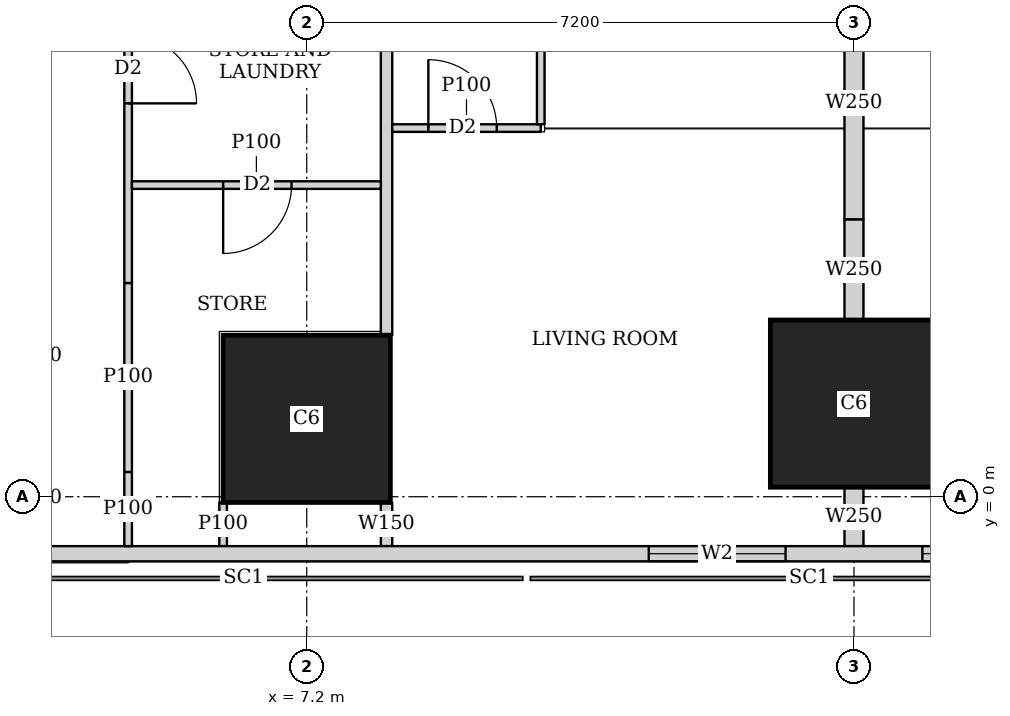
"""IFC4 building model, lengths in metres.
Left out: names, types, materials, properties, quantities, classifications, styles, units other than length and angle.
Written with IfcOpenShell. Run it as: python <this file> out.ifc"""

import sys

from ifc_helpers import new_model, si_unit, direction, frame, frame_2d, origin, origin_2d, place, context, subcontext, project, spatial, rectangle, extrude, element, fill, save


model = new_model("IFC4")
c1 = context("Model", 3, precision=1e-05, world=origin(), true_north=direction((0.0, 1.0)))
c2 = subcontext(c1, "Body", "Model", "MODEL_VIEW")
j1 = project(units=[si_unit("LENGTHUNIT", "METRE"), si_unit("PLANEANGLEUNIT", "RADIAN")], contexts=[c1])
p1 = place(None, origin())
s1 = spatial("IfcSite", under=j1, at=p1, CompositionType="ELEMENT")
p2 = place(p1, origin())
s2 = spatial("IfcBuilding", under=s1, at=p2, CompositionType="ELEMENT")
p3 = place(p2, frame((0.0, 0.0, 77.9)))
s3 = spatial("IfcBuildingStorey", under=s2, at=p3, CompositionType="ELEMENT", Elevation=77.9)
for number, where, z_axis, x_axis in (
    (1, (7.2, 1.025, 0.0), (0.0, 0.0, 1.0), (1.0, 0.0, 0.0)),
    (2, (14.4, 1.225, 0.0), (0.0, 0.0, 1.0), (1.0, 0.0, 0.0)),
):
    element("IfcColumn", number, at=place(p3, frame(where, z_axis=z_axis, x_axis=x_axis)), inside=s3, PredefinedType="COLUMN", context=c2, shape_type="SweptSolid", body=[
        extrude(rectangle(XDim=2.2, YDim=2.2, at=origin_2d()), origin(), (0.0, 0.0, 1.0), 3.75),
    ])
p4 = place(p3, frame((2.163, -0.75, 0.0), z_axis=(0.0, 0.0, 1.0), x_axis=(1.0, 0.0, 0.0)))
e3 = element("IfcWall", 3, at=p4, inside=s3, PredefinedType="SOLIDWALL", context=c2, shape_type="SweptSolid", body=[
    extrude(rectangle(XDim=45.628, YDim=0.2, at=frame_2d((22.814, 0.0))), origin(), (0.0, 0.0, 1.0), 3.5),
])
p5 = place(p4, frame((9.537, 0.0, 0.9)))
e4 = element("IfcOpeningElement", 4, at=p5, cuts=e3, PredefinedType="OPENING", context=c2, shape_type="SweptSolid", body=[
    extrude(rectangle(XDim=1.8, YDim=1.5, at=frame_2d((0.9, 0.75))), frame((0.0, 0.11, 0.0), z_axis=(0.0, -1.0, 0.0), x_axis=(1.0, 0.0, 0.0)), (0.0, 0.0, 1.0), 0.22),
])
p6 = place(p4, frame((13.137, 0.0, 0.9)))
e5 = element("IfcOpeningElement", 5, at=p6, cuts=e3, PredefinedType="OPENING", context=c2, shape_type="SweptSolid", body=[
    extrude(rectangle(XDim=1.8, YDim=1.5, at=frame_2d((0.9, 0.75))), frame((0.0, 0.11, 0.0), z_axis=(0.0, -1.0, 0.0), x_axis=(1.0, 0.0, 0.0)), (0.0, 0.0, 1.0), 0.22),
])
p7 = place(p4, frame((16.737, 0.0, 0.9)))
e6 = element("IfcOpeningElement", 6, at=p7, cuts=e3, PredefinedType="OPENING", context=c2, shape_type="SweptSolid", body=[
    extrude(rectangle(XDim=1.8, YDim=1.5, at=frame_2d((0.9, 0.75))), frame((0.0, 0.11, 0.0), z_axis=(0.0, -1.0, 0.0), x_axis=(1.0, 0.0, 0.0)), (0.0, 0.0, 1.0), 0.22),
])
p8 = place(p4, frame((20.337, 0.0, 0.9)))
e7 = element("IfcOpeningElement", 7, at=p8, cuts=e3, PredefinedType="OPENING", context=c2, shape_type="SweptSolid", body=[
    extrude(rectangle(XDim=1.8, YDim=1.5, at=frame_2d((0.9, 0.75))), frame((0.0, 0.11, 0.0), z_axis=(0.0, -1.0, 0.0), x_axis=(1.0, 0.0, 0.0)), (0.0, 0.0, 1.0), 0.22),
])
p9 = place(p4, frame((23.937, 0.0, 0.9)))
e8 = element("IfcOpeningElement", 8, at=p9, cuts=e3, PredefinedType="OPENING", context=c2, shape_type="SweptSolid", body=[
    extrude(rectangle(XDim=1.8, YDim=1.5, at=frame_2d((0.9, 0.75))), frame((0.0, 0.11, 0.0), z_axis=(0.0, -1.0, 0.0), x_axis=(1.0, 0.0, 0.0)), (0.0, 0.0, 1.0), 0.22),
])
p10 = place(p4, frame((27.537, 0.0, 0.9)))
e9 = element("IfcOpeningElement", 9, at=p10, cuts=e3, PredefinedType="OPENING", context=c2, shape_type="SweptSolid", body=[
    extrude(rectangle(XDim=1.8, YDim=1.5, at=frame_2d((0.9, 0.75))), frame((0.0, 0.11, 0.0), z_axis=(0.0, -1.0, 0.0), x_axis=(1.0, 0.0, 0.0)), (0.0, 0.0, 1.0), 0.22),
])
p11 = place(p4, frame((31.137, 0.0, 0.9)))
e10 = element("IfcOpeningElement", 10, at=p11, cuts=e3, PredefinedType="OPENING", context=c2, shape_type="SweptSolid", body=[
    extrude(rectangle(XDim=1.8, YDim=1.5, at=frame_2d((0.9, 0.75))), frame((0.0, 0.11, 0.0), z_axis=(0.0, -1.0, 0.0), x_axis=(1.0, 0.0, 0.0)), (0.0, 0.0, 1.0), 0.22),
])
p12 = place(p4, frame((34.737, 0.0, 0.9)))
e11 = element("IfcOpeningElement", 11, at=p12, cuts=e3, PredefinedType="OPENING", context=c2, shape_type="SweptSolid", body=[
    extrude(rectangle(XDim=1.8, YDim=1.5, at=frame_2d((0.9, 0.75))), frame((0.0, 0.11, 0.0), z_axis=(0.0, -1.0, 0.0), x_axis=(1.0, 0.0, 0.0)), (0.0, 0.0, 1.0), 0.22),
])
p13 = place(p3, frame((8.25, -0.65, 0.0), z_axis=(0.0, 0.0, 1.0), x_axis=(0.0, 1.0, 0.0)))
e12 = element("IfcWall", 12, at=p13, inside=s3, PredefinedType="SOLIDWALL", context=c2, shape_type="SweptSolid", body=[
    extrude(rectangle(XDim=0.574, YDim=0.15, at=frame_2d((0.287, 0.0))), origin(), (0.0, 0.0, 1.0), 3.5),
])
p14 = place(p3, frame((8.25, 2.126, 0.0), z_axis=(0.0, 0.0, 1.0), x_axis=(0.0, 1.0, 0.0)))
e13 = element("IfcWall", 13, at=p14, inside=s3, PredefinedType="SOLIDWALL", context=c2, shape_type="SweptSolid", body=[
    extrude(rectangle(XDim=40.773, YDim=0.15, at=frame_2d((20.386, 0.0))), origin(), (0.0, 0.0, 1.0), 3.5),
])
p15 = place(p14, frame((17.787, 0.0, 0.0)))
e14 = element("IfcOpeningElement", 14, at=p15, cuts=e13, PredefinedType="OPENING", context=c2, shape_type="SweptSolid", body=[
    extrude(rectangle(XDim=1.0, YDim=2.1, at=frame_2d((0.5, 1.05))), frame((0.0, 0.085, 0.0), z_axis=(0.0, -1.0, 0.0), x_axis=(1.0, 0.0, 0.0)), (0.0, 0.0, 1.0), 0.17),
])
p16 = place(p14, frame((21.962, 0.0, 0.0)))
e15 = element("IfcOpeningElement", 15, at=p16, cuts=e13, PredefinedType="OPENING", context=c2, shape_type="SweptSolid", body=[
    extrude(rectangle(XDim=1.0, YDim=2.1, at=frame_2d((0.5, 1.05))), frame((0.0, 0.085, 0.0), z_axis=(0.0, -1.0, 0.0), x_axis=(1.0, 0.0, 0.0)), (0.0, 0.0, 1.0), 0.17),
])
p17 = place(p14, frame((32.787, 0.0, 0.0)))
e16 = element("IfcOpeningElement", 16, at=p17, cuts=e13, PredefinedType="OPENING", context=c2, shape_type="SweptSolid", body=[
    extrude(rectangle(XDim=1.0, YDim=2.1, at=frame_2d((0.5, 1.05))), frame((0.0, 0.085, 0.0), z_axis=(0.0, -1.0, 0.0), x_axis=(1.0, 0.0, 0.0)), (0.0, 0.0, 1.0), 0.17),
])
p18 = place(p3, frame((6.1, -0.65, 0.0), z_axis=(0.0, 0.0, 1.0), x_axis=(0.0, 1.0, 0.0)))
e17 = element("IfcWall", 17, at=p18, inside=s3, PredefinedType="PARTITIONING", context=c2, shape_type="SweptSolid", body=[
    extrude(rectangle(XDim=0.575, YDim=0.1, at=frame_2d((0.288, 0.0))), origin(), (0.0, 0.0, 1.0), 3.5),
])
p19 = place(p3, frame((4.85, -0.65, 0.0), z_axis=(0.0, 0.0, 1.0), x_axis=(0.0, 1.0, 0.0)))
e18 = element("IfcWall", 18, at=p19, inside=s3, PredefinedType="PARTITIONING", context=c2, shape_type="SweptSolid", body=[
    extrude(rectangle(XDim=0.976, YDim=0.1, at=frame_2d((0.488, 0.0))), origin(), (0.0, 0.0, 1.0), 3.5),
])
p20 = place(p3, frame((4.85, 0.326, 0.0), z_axis=(0.0, 0.0, 1.0), x_axis=(0.0, 1.0, 0.0)))
e19 = element("IfcWall", 19, at=p20, inside=s3, PredefinedType="PARTITIONING", context=c2, shape_type="SweptSolid", body=[
    extrude(rectangle(XDim=2.486, YDim=0.1, at=frame_2d((1.243, 0.0))), origin(), (0.0, 0.0, 1.0), 2.05),
])
p21 = place(p3, frame((4.85, 2.812, 0.0), z_axis=(0.0, 0.0, 1.0), x_axis=(0.0, 1.0, 0.0)))
e20 = element("IfcWall", 20, at=p21, inside=s3, PredefinedType="PARTITIONING", context=c2, shape_type="SweptSolid", body=[
    extrude(rectangle(XDim=15.938, YDim=0.1, at=frame_2d((7.969, 0.0))), origin(), (0.0, 0.0, 1.0), 3.5),
])
p22 = place(p21, frame((14.383, 0.0, 0.0)))
e21 = element("IfcOpeningElement", 21, at=p22, cuts=e20, PredefinedType="OPENING", context=c2, shape_type="SweptSolid", body=[
    extrude(rectangle(XDim=0.9, YDim=2.1, at=frame_2d((0.45, 1.05))), frame((0.0, 0.06, 0.0), z_axis=(0.0, -1.0, 0.0), x_axis=(1.0, 0.0, 0.0)), (0.0, 0.0, 1.0), 0.12),
])
p23 = place(p21, frame((10.938, 0.0, 0.0)))
e22 = element("IfcOpeningElement", 22, at=p23, cuts=e20, PredefinedType="OPENING", context=c2, shape_type="SweptSolid", body=[
    extrude(rectangle(XDim=0.9, YDim=2.1, at=frame_2d((0.45, 1.05))), frame((0.0, 0.06, 0.0), z_axis=(0.0, -1.0, 0.0), x_axis=(1.0, 0.0, 0.0)), (0.0, 0.0, 1.0), 0.12),
])
p24 = place(p21, frame((7.078, 0.0, 0.0)))
e23 = element("IfcOpeningElement", 23, at=p24, cuts=e20, PredefinedType="OPENING", context=c2, shape_type="SweptSolid", body=[
    extrude(rectangle(XDim=0.9, YDim=2.1, at=frame_2d((0.45, 1.05))), frame((0.0, 0.06, 0.0), z_axis=(0.0, -1.0, 0.0), x_axis=(1.0, 0.0, 0.0)), (0.0, 0.0, 1.0), 0.12),
])
p25 = place(p21, frame((2.363, 0.0, 0.0)))
e24 = element("IfcOpeningElement", 24, at=p25, cuts=e20, PredefinedType="OPENING", context=c2, shape_type="SweptSolid", body=[
    extrude(rectangle(XDim=0.9, YDim=2.1, at=frame_2d((0.45, 1.05))), frame((0.0, 0.06, 0.0), z_axis=(0.0, -1.0, 0.0), x_axis=(1.0, 0.0, 0.0)), (0.0, 0.0, 1.0), 0.12),
])
p26 = place(p21, frame((12.508, 0.0, 0.0)))
e25 = element("IfcOpeningElement", 25, at=p26, cuts=e20, PredefinedType="OPENING", context=c2, shape_type="SweptSolid", body=[
    extrude(rectangle(XDim=0.9, YDim=2.1, at=frame_2d((0.45, 1.05))), frame((0.0, 0.06, 0.0), z_axis=(0.0, -1.0, 0.0), x_axis=(1.0, 0.0, 0.0)), (0.0, 0.0, 1.0), 0.12),
])
p27 = place(p21, frame((9.063, 0.0, 0.0)))
e26 = element("IfcOpeningElement", 26, at=p27, cuts=e20, PredefinedType="OPENING", context=c2, shape_type="SweptSolid", body=[
    extrude(rectangle(XDim=0.9, YDim=2.1, at=frame_2d((0.45, 1.05))), frame((0.0, 0.06, 0.0), z_axis=(0.0, -1.0, 0.0), x_axis=(1.0, 0.0, 0.0)), (0.0, 0.0, 1.0), 0.12),
])
p28 = place(p21, frame((5.203, 0.0, 0.0)))
e27 = element("IfcOpeningElement", 27, at=p28, cuts=e20, PredefinedType="OPENING", context=c2, shape_type="SweptSolid", body=[
    extrude(rectangle(XDim=0.9, YDim=2.1, at=frame_2d((0.45, 1.05))), frame((0.0, 0.06, 0.0), z_axis=(0.0, -1.0, 0.0), x_axis=(1.0, 0.0, 0.0)), (0.0, 0.0, 1.0), 0.12),
])
p29 = place(p3, frame((10.279, 4.85, 0.0), z_axis=(0.0, 0.0, 1.0), x_axis=(-1.0, 0.0, 0.0)))
e28 = element("IfcWall", 28, at=p29, inside=s3, PredefinedType="PARTITIONING", context=c2, shape_type="SweptSolid", body=[
    extrude(rectangle(XDim=1.954, YDim=0.1, at=frame_2d((0.977, 0.0))), origin(), (0.0, 0.0, 1.0), 3.5),
])
p30 = place(p29, frame((0.579, 0.0, 0.0)))
e29 = element("IfcOpeningElement", 29, at=p30, cuts=e28, PredefinedType="OPENING", context=c2, shape_type="SweptSolid", body=[
    extrude(rectangle(XDim=0.9, YDim=2.1, at=frame_2d((0.45, 1.05))), frame((0.0, 0.06, 0.0), z_axis=(0.0, -1.0, 0.0), x_axis=(1.0, 0.0, 0.0)), (0.0, 0.0, 1.0), 0.12),
])
p31 = place(p3, frame((10.279, 4.9, 0.0), z_axis=(0.0, 0.0, 1.0), x_axis=(0.0, 1.0, 0.0)))
e30 = element("IfcWall", 30, at=p31, inside=s3, PredefinedType="PARTITIONING", context=c2, shape_type="SweptSolid", body=[
    extrude(rectangle(XDim=3.275, YDim=0.1, at=frame_2d((1.638, 0.0))), origin(), (0.0, 0.0, 1.0), 3.5),
])
p32 = place(p3, frame((14.4, -0.65, 0.0), z_axis=(0.0, 0.0, 1.0), x_axis=(0.0, 1.0, 0.0)))
e31 = element("IfcWall", 31, at=p32, inside=s3, PredefinedType="SOLIDWALL", context=c2, shape_type="SweptSolid", body=[
    extrude(rectangle(XDim=0.774, YDim=0.25, at=frame_2d((0.387, 0.0))), origin(), (0.0, 0.0, 1.0), 3.5),
])
p33 = place(p3, frame((14.4, 2.326, 0.0), z_axis=(0.0, 0.0, 1.0), x_axis=(0.0, 1.0, 0.0)))
e32 = element("IfcWall", 32, at=p33, inside=s3, PredefinedType="SOLIDWALL", context=c2, shape_type="SweptSolid", body=[
    extrude(rectangle(XDim=1.324, YDim=0.25, at=frame_2d((0.662, 0.0))), origin(), (0.0, 0.0, 1.0), 3.5),
])
p34 = place(p3, frame((14.4, 3.65, 0.0), z_axis=(0.0, 0.0, 1.0), x_axis=(0.0, 1.0, 0.0)))
e33 = element("IfcWall", 33, at=p34, inside=s3, PredefinedType="SOLIDWALL", context=c2, shape_type="SweptSolid", body=[
    extrude(rectangle(XDim=3.049, YDim=0.25, at=frame_2d((1.524, 0.0))), origin(), (0.0, 0.0, 1.0), 3.5),
])
p35 = place(p3, frame((8.175, 4.1, 0.0), z_axis=(0.0, 0.0, 1.0), x_axis=(-1.0, 0.0, 0.0)))
e34 = element("IfcWall", 34, at=p35, inside=s3, PredefinedType="PARTITIONING", context=c2, shape_type="SweptSolid", body=[
    extrude(rectangle(XDim=3.275, YDim=0.1, at=frame_2d((1.638, 0.0))), origin(), (0.0, 0.0, 1.0), 3.5),
])
p36 = place(p35, frame((1.175, 0.0, 0.0)))
e35 = element("IfcOpeningElement", 35, at=p36, cuts=e34, PredefinedType="OPENING", context=c2, shape_type="SweptSolid", body=[
    extrude(rectangle(XDim=0.9, YDim=2.1, at=frame_2d((0.45, 1.05))), frame((0.0, 0.06, 0.0), z_axis=(0.0, -1.0, 0.0), x_axis=(1.0, 0.0, 0.0)), (0.0, 0.0, 1.0), 0.12),
])
p37 = place(p5, origin())
e36 = element("IfcWindow", 36, at=p37, inside=s3, PartitioningType="SINGLE_PANEL", PredefinedType="WINDOW", context=c2, shape_type="SweptSolid", body=[
    extrude(rectangle(XDim=1.8, YDim=1.5, at=frame_2d((0.9, 0.75))), frame((0.0, 0.03, 0.0), z_axis=(0.0, -1.0, 0.0), x_axis=(1.0, 0.0, 0.0)), (0.0, 0.0, 1.0), 0.06),
])
fill(e4, e36)
p38 = place(p6, origin())
e37 = element("IfcWindow", 37, at=p38, inside=s3, PartitioningType="SINGLE_PANEL", PredefinedType="WINDOW", context=c2, shape_type="SweptSolid", body=[
    extrude(rectangle(XDim=1.8, YDim=1.5, at=frame_2d((0.9, 0.75))), frame((0.0, 0.03, 0.0), z_axis=(0.0, -1.0, 0.0), x_axis=(1.0, 0.0, 0.0)), (0.0, 0.0, 1.0), 0.06),
])
fill(e5, e37)
p39 = place(p25, origin())
e38 = element("IfcDoor", 38, at=p39, inside=s3, OperationType="SINGLE_SWING_RIGHT", PredefinedType="DOOR", context=c2, shape_type="SweptSolid", body=[
    extrude(rectangle(XDim=0.9, YDim=2.1, at=frame_2d((0.45, 1.05))), frame((0.0, 0.025, 0.0), z_axis=(0.0, -1.0, 0.0), x_axis=(1.0, 0.0, 0.0)), (0.0, 0.0, 1.0), 0.05),
])
fill(e24, e38)
p40 = place(p30, origin())
e39 = element("IfcDoor", 39, at=p40, inside=s3, OperationType="SINGLE_SWING_LEFT", PredefinedType="DOOR", context=c2, shape_type="SweptSolid", body=[
    extrude(rectangle(XDim=0.9, YDim=2.1, at=frame_2d((0.45, 1.05))), frame((0.0, 0.025, 0.0), z_axis=(0.0, -1.0, 0.0), x_axis=(1.0, 0.0, 0.0)), (0.0, 0.0, 1.0), 0.05),
])
fill(e29, e39)
p41 = place(p36, origin())
e40 = element("IfcDoor", 40, at=p41, inside=s3, OperationType="SINGLE_SWING_RIGHT", PredefinedType="DOOR", context=c2, shape_type="SweptSolid", body=[
    extrude(rectangle(XDim=0.9, YDim=2.1, at=frame_2d((0.45, 1.05))), frame((0.0, 0.025, 0.0), z_axis=(0.0, -1.0, 0.0), x_axis=(1.0, 0.0, 0.0)), (0.0, 0.0, 1.0), 0.05),
])
fill(e35, e40)
save(model, sys.argv[1])
